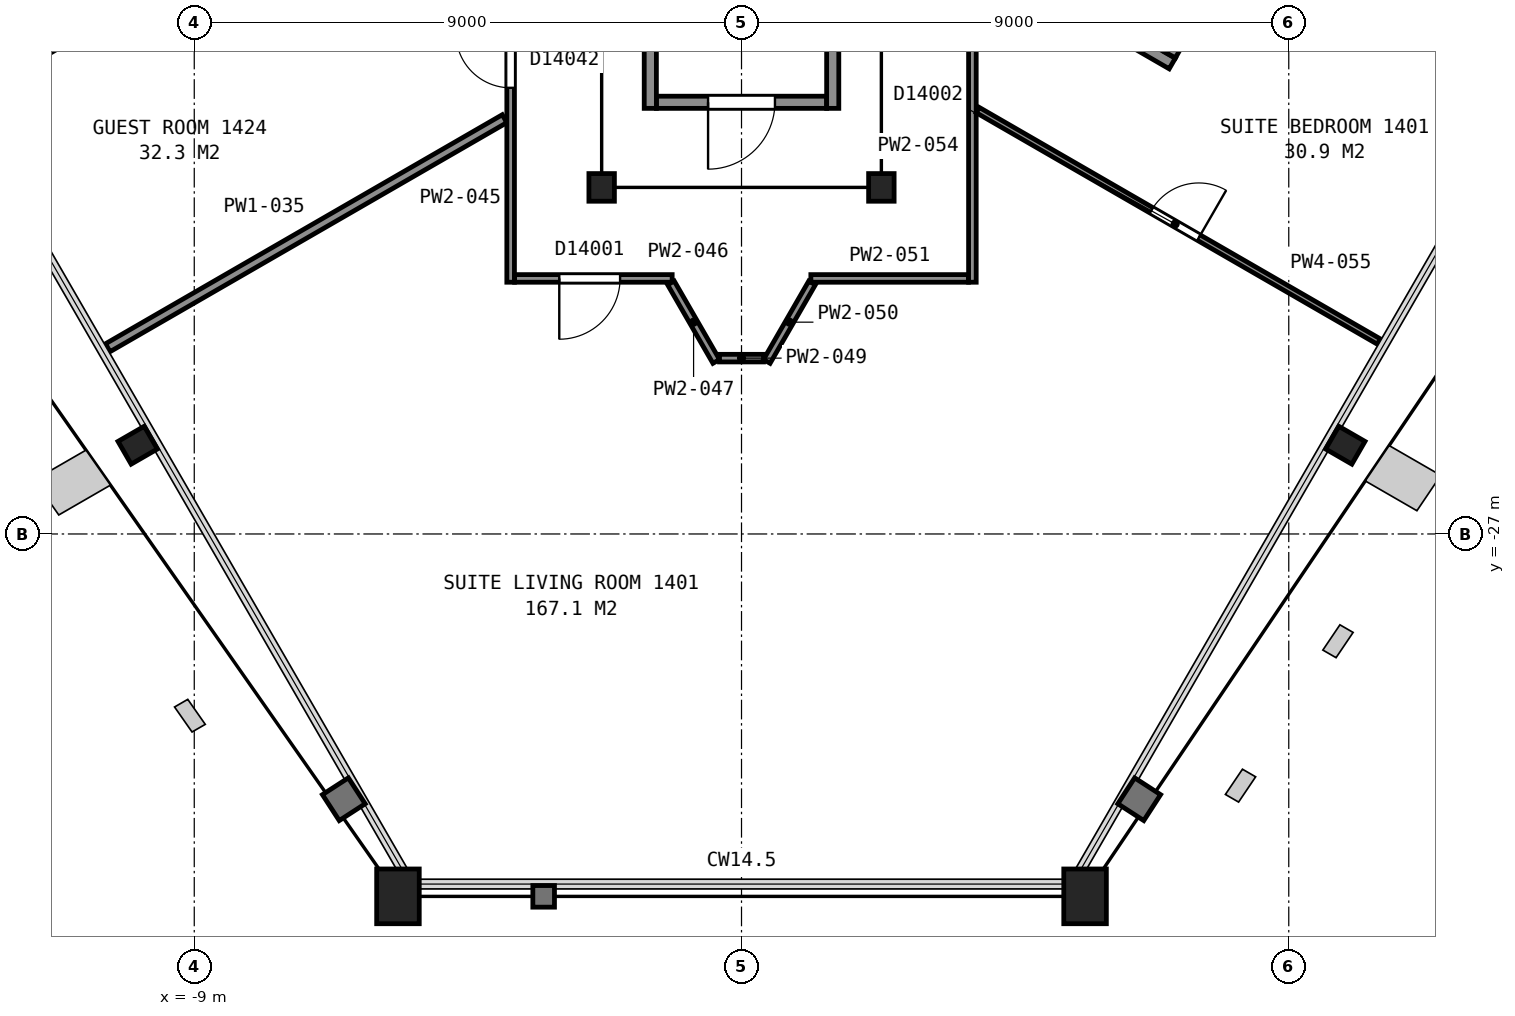
"""IFC4 building model, lengths in metres.
Left out: names, types, materials, properties, quantities, classifications, styles, units other than length and angle.
Written with IfcOpenShell. Run it as: python <this file> out.ifc"""

import sys

from ifc_helpers import new_model, si_unit, direction, frame, frame_2d, origin, origin_2d, place, context, subcontext, project, spatial, rectangle, hollow_rectangle, i_section, extrude, element, fill, save


model = new_model("IFC4")
c1 = context("Model", 3, precision=1e-05, world=origin(), true_north=direction((0.0, 1.0)))
c2 = subcontext(c1, "Body", "Model", "MODEL_VIEW")
j1 = project(units=[si_unit("LENGTHUNIT", "METRE"), si_unit("PLANEANGLEUNIT", "RADIAN")], contexts=[c1])
p1 = place(None, origin())
s1 = spatial("IfcSite", under=j1, at=p1, CompositionType="ELEMENT")
p2 = place(p1, origin())
s2 = spatial("IfcBuilding", under=s1, at=p2, CompositionType="ELEMENT")
p3 = place(p2, frame((0.0, 0.0, 65.6)))
s3 = spatial("IfcBuildingStorey", under=s2, at=p3, CompositionType="ELEMENT", Elevation=65.6)
p4 = place(p3, frame((-9.93, -25.54, 0.025), z_axis=(0.0, 0.0, 1.0), x_axis=(-0.5, 0.866025403784, 0.0)))
e1 = element("IfcColumn", 1, at=p4, inside=s3, PredefinedType="COLUMN", context=c2, shape_type="SweptSolid", body=[
    extrude(i_section(OverallWidth=0.432, OverallDepth=0.498, WebThickness=0.056, FlangeThickness=0.089, FilletRadius=0.015, at=origin_2d()), origin(), (0.0, 0.0, 1.0), 3.575),
])
for number, where, z_axis, x_axis in (
    (2, (-5.65, -32.96, 0.04), (0.0, 0.0, 1.0), (-1.0, 0.0, 0.0)),
    (3, (5.65, -32.96, 0.04), (0.0, 0.0, 1.0), (-1.0, 0.0, 0.0)),
):
    element("IfcColumn", number, at=place(p3, frame(where, z_axis=z_axis, x_axis=x_axis)), inside=s3, PredefinedType="COLUMN", context=c2, shape_type="SweptSolid", body=[
        extrude(hollow_rectangle(XDim=0.7, YDim=0.9, WallThickness=0.065, at=origin_2d()), origin(), (0.0, 0.0, 1.0), 3.56),
    ])
p5 = place(p3, frame((9.93, -25.54, 0.025), z_axis=(0.0, 0.0, 1.0), x_axis=(-0.5, -0.866025403784, 0.0)))
e4 = element("IfcColumn", 4, at=p5, inside=s3, PredefinedType="COLUMN", context=c2, shape_type="SweptSolid", body=[
    extrude(i_section(OverallWidth=0.432, OverallDepth=0.498, WebThickness=0.056, FlangeThickness=0.089, FilletRadius=0.015, at=origin_2d()), origin(), (0.0, 0.0, 1.0), 3.575),
])
for number, where, z_axis, x_axis in (
    (5, (-2.3, -21.3, 0.0), (0.0, 0.0, 1.0), (-1.0, 0.0, 0.0)),
    (6, (2.3, -21.3, 0.0), (0.0, 0.0, 1.0), (-1.0, 0.0, 0.0)),
):
    element("IfcColumn", number, at=place(p3, frame(where, z_axis=z_axis, x_axis=x_axis)), inside=s3, PredefinedType="COLUMN", context=c2, shape_type="SweptSolid", body=[
        extrude(i_section(OverallWidth=0.419, OverallDepth=0.455, WebThickness=0.042, FlangeThickness=0.068, FilletRadius=0.015, at=origin_2d()), origin(), (0.0, 0.0, 1.0), 3.6),
    ])
p6 = place(p3, frame((-1.4, -19.9, 0.0), z_axis=(0.0, 0.0, 1.0), x_axis=(1.0, 0.0, 0.0)))
e7 = element("IfcWall", 7, at=p6, inside=s3, PredefinedType="PARTITIONING", context=c2, shape_type="SweptSolid", body=[
    extrude(rectangle(XDim=2.8, YDim=0.2, at=frame_2d((1.4, 0.0))), origin(), (0.0, 0.0, 1.0), 3.35),
])
p7 = place(p6, frame((0.85, 0.0, 0.0)))
e8 = element("IfcOpeningElement", 8, at=p7, cuts=e7, PredefinedType="OPENING", context=c2, shape_type="SweptSolid", body=[
    extrude(rectangle(XDim=1.1, YDim=2.1, at=frame_2d((0.55, 1.05))), frame((0.0, 0.11, 0.0), z_axis=(0.0, -1.0, 0.0), x_axis=(1.0, 0.0, 0.0)), (0.0, 0.0, 1.0), 0.22),
])
for number, where, z_axis, x_axis in (
    (9, (1.5, -8.0, 0.0), (0.0, 0.0, 1.0), (0.0, -1.0, 0.0)),
    (10, (-1.5, -8.0, 0.0), (0.0, 0.0, 1.0), (0.0, -1.0, 0.0)),
):
    element("IfcWall", number, at=place(p3, frame(where, z_axis=z_axis, x_axis=x_axis)), inside=s3, PredefinedType="PARTITIONING", context=c2, shape_type="SweptSolid", body=[
        extrude(rectangle(XDim=12.0, YDim=0.2, at=frame_2d((6.0, 0.0))), origin(), (0.0, 0.0, 1.0), 3.35),
    ])
p8 = place(p3, frame((-12.794, -19.829, 0.0), z_axis=(0.0, 0.0, 1.0), x_axis=(0.866024716685, 0.500001190089, 0.0)))
e11 = element("IfcWall", 11, at=p8, inside=s3, PredefinedType="PARTITIONING", context=c2, shape_type="SweptSolid", body=[
    extrude(rectangle(XDim=8.492, YDim=0.15, at=frame_2d((4.246, 0.0))), origin(), (0.0, 0.0, 1.0), 2.613),
])
p9 = place(p3, frame((-10.423, -23.937, 0.0), z_axis=(0.0, 0.0, 1.0), x_axis=(0.866039368072, 0.499975812365, 0.0)))
e12 = element("IfcWall", 12, at=p9, inside=s3, PredefinedType="PARTITIONING", context=c2, shape_type="SweptSolid", body=[
    extrude(rectangle(XDim=7.535, YDim=0.15, at=frame_2d((3.768, 0.0))), origin(), (0.0, 0.0, 1.0), 2.613),
])
p10 = place(p3, frame((-3.797, -22.86, 0.0), z_axis=(0.0, 0.0, 1.0), x_axis=(0.0, 1.0, 0.0)))
e13 = element("IfcWall", 13, at=p10, inside=s3, PredefinedType="PARTITIONING", context=c2, shape_type="SweptSolid", body=[
    extrude(rectangle(XDim=4.471, YDim=0.125, at=frame_2d((2.235, 0.0))), origin(), (0.0, 0.0, 1.0), 2.613),
])
p11 = place(p10, frame((3.198, 0.0, 0.0)))
e14 = element("IfcOpeningElement", 14, at=p11, cuts=e13, PredefinedType="OPENING", context=c2, shape_type="SweptSolid", body=[
    extrude(rectangle(XDim=0.9, YDim=2.1, at=frame_2d((0.45, 1.05))), frame((0.0, 0.073, 0.0), z_axis=(0.0, -1.0, 0.0), x_axis=(1.0, 0.0, 0.0)), (0.0, 0.0, 1.0), 0.145),
])
p12 = place(p3, frame((-1.14, -22.797, 0.0), z_axis=(0.0, 0.0, 1.0), x_axis=(-1.0, 0.0, 0.0)))
e15 = element("IfcWall", 15, at=p12, inside=s3, PredefinedType="PARTITIONING", context=c2, shape_type="SweptSolid", body=[
    extrude(rectangle(XDim=2.592, YDim=0.125, at=frame_2d((1.296, 0.0))), origin(), (0.0, 0.0, 1.0), 2.613),
])
p13 = place(p12, frame((0.856, 0.0, 0.0)))
e16 = element("IfcOpeningElement", 16, at=p13, cuts=e15, PredefinedType="OPENING", context=c2, shape_type="SweptSolid", body=[
    extrude(rectangle(XDim=1.0, YDim=2.1, at=frame_2d((0.5, 1.05))), frame((0.0, 0.073, 0.0), z_axis=(0.0, -1.0, 0.0), x_axis=(1.0, 0.0, 0.0)), (0.0, 0.0, 1.0), 0.145),
])
p14 = place(p3, frame((-1.161, -22.871, 0.0), z_axis=(0.0, 0.0, 1.0), x_axis=(0.499609040113, -0.866251006947, 0.0)))
e17 = element("IfcWall", 17, at=p14, inside=s3, PredefinedType="PARTITIONING", context=c2, shape_type="SweptSolid", body=[
    extrude(rectangle(XDim=1.491, YDim=0.125, at=frame_2d((0.746, 0.0))), origin(), (0.0, 0.0, 1.0), 2.613),
])
p15 = place(p3, frame((-0.362, -24.108, 0.0), z_axis=(0.0, 0.0, 1.0), x_axis=(1.0, 0.0, 0.0)))
e18 = element("IfcWall", 18, at=p15, inside=s3, PredefinedType="PARTITIONING", context=c2, shape_type="SweptSolid", body=[
    extrude(rectangle(XDim=0.724, YDim=0.125, at=frame_2d((0.362, 0.0))), origin(), (0.0, 0.0, 1.0), 2.613),
])
p16 = place(p3, frame((0.416, -24.162, 0.0), z_axis=(0.0, 0.0, 1.0), x_axis=(0.499609040113, 0.866251006947, 0.0)))
e19 = element("IfcWall", 19, at=p16, inside=s3, PredefinedType="PARTITIONING", context=c2, shape_type="SweptSolid", body=[
    extrude(rectangle(XDim=1.491, YDim=0.125, at=frame_2d((0.746, 0.0))), origin(), (0.0, 0.0, 1.0), 2.613),
])
p17 = place(p3, frame((1.14, -22.797, 0.0), z_axis=(0.0, 0.0, 1.0), x_axis=(1.0, 0.0, 0.0)))
e20 = element("IfcWall", 20, at=p17, inside=s3, PredefinedType="PARTITIONING", context=c2, shape_type="SweptSolid", body=[
    extrude(rectangle(XDim=2.592, YDim=0.125, at=frame_2d((1.296, 0.0))), origin(), (0.0, 0.0, 1.0), 2.613),
])
p18 = place(p3, frame((3.797, -22.86, 0.0), z_axis=(0.0, 0.0, 1.0), x_axis=(0.0, 1.0, 0.0)))
e21 = element("IfcWall", 21, at=p18, inside=s3, PredefinedType="PARTITIONING", context=c2, shape_type="SweptSolid", body=[
    extrude(rectangle(XDim=4.471, YDim=0.125, at=frame_2d((2.235, 0.0))), origin(), (0.0, 0.0, 1.0), 2.613),
])
p19 = place(p3, frame((3.885, -20.028, 0.0), z_axis=(0.0, 0.0, 1.0), x_axis=(0.866080975745, -0.499903734186, 0.0)))
e22 = element("IfcWall", 22, at=p19, inside=s3, PredefinedType="PARTITIONING", context=c2, shape_type="SweptSolid", body=[
    extrude(rectangle(XDim=7.617, YDim=0.1, at=frame_2d((3.808, 0.0))), origin(), (0.0, 0.0, 1.0), 2.613),
])
p20 = place(p19, frame((3.299, 0.0, 0.0)))
e23 = element("IfcOpeningElement", 23, at=p20, cuts=e22, PredefinedType="OPENING", context=c2, shape_type="SweptSolid", body=[
    extrude(rectangle(XDim=0.9, YDim=2.1, at=frame_2d((0.45, 1.05))), frame((0.0, 0.06, 0.0), z_axis=(0.0, -1.0, 0.0), x_axis=(1.0, 0.0, 0.0)), (0.0, 0.0, 1.0), 0.12),
])
p21 = place(p3, frame((4.258, -17.631, 0.0), z_axis=(0.0, 0.0, 1.0), x_axis=(0.865982457891, -0.500074377092, 0.0)))
e24 = element("IfcWall", 24, at=p21, inside=s3, PredefinedType="PARTITIONING", context=c2, shape_type="SweptSolid", body=[
    extrude(rectangle(XDim=3.263, YDim=0.2, at=frame_2d((1.631, 0.0))), origin(), (0.0, 0.0, 1.0), 2.613),
])
p22 = place(p3, frame((5.558, -15.38, 0.0), z_axis=(0.0, 0.0, 1.0), x_axis=(0.866022790583, -0.50000452617, 0.0)))
e25 = element("IfcWall", 25, at=p22, inside=s3, PredefinedType="PARTITIONING", context=c2, shape_type="SweptSolid", body=[
    extrude(rectangle(XDim=8.491, YDim=0.15, at=frame_2d((4.246, 0.0))), origin(), (0.0, 0.0, 1.0), 2.613),
])
p23 = place(p3, frame((7.049, -19.122, 0.0), z_axis=(0.0, 0.0, 1.0), x_axis=(0.491544985814, 0.870852184312, 0.0)))
e26 = element("IfcWall", 26, at=p23, inside=s3, PredefinedType="PARTITIONING", context=c2, shape_type="SweptSolid", body=[
    extrude(rectangle(XDim=2.419, YDim=0.2, at=frame_2d((1.209, 0.0))), origin(), (0.0, 0.0, 1.0), 2.613),
])
p24 = place(p23, frame((0.795, 0.0, 0.0)))
e27 = element("IfcOpeningElement", 27, at=p24, cuts=e26, PredefinedType="OPENING", context=c2, shape_type="SweptSolid", body=[
    extrude(rectangle(XDim=0.8, YDim=2.1, at=frame_2d((0.4, 1.05))), frame((0.0, 0.11, 0.0), z_axis=(0.0, -1.0, 0.0), x_axis=(1.0, 0.0, 0.0)), (0.0, 0.0, 1.0), 0.22),
])
p25 = place(p7, origin())
e28 = element("IfcDoor", 28, at=p25, inside=s3, OperationType="SINGLE_SWING_LEFT", PredefinedType="DOOR", context=c2, shape_type="SweptSolid", body=[
    extrude(rectangle(XDim=1.1, YDim=2.1, at=frame_2d((0.55, 1.05))), frame((0.0, 0.025, 0.0), z_axis=(0.0, -1.0, 0.0), x_axis=(1.0, 0.0, 0.0)), (0.0, 0.0, 1.0), 0.05),
])
fill(e8, e28)
p26 = place(p11, origin())
e29 = element("IfcDoor", 29, at=p26, inside=s3, OperationType="SINGLE_SWING_RIGHT", PredefinedType="DOOR", context=c2, shape_type="SweptSolid", body=[
    extrude(rectangle(XDim=0.9, YDim=2.1, at=frame_2d((0.45, 1.05))), frame((0.0, 0.025, 0.0), z_axis=(0.0, -1.0, 0.0), x_axis=(1.0, 0.0, 0.0)), (0.0, 0.0, 1.0), 0.05),
])
fill(e14, e29)
p27 = place(p13, origin())
e30 = element("IfcDoor", 30, at=p27, inside=s3, OperationType="SINGLE_SWING_RIGHT", PredefinedType="DOOR", context=c2, shape_type="SweptSolid", body=[
    extrude(rectangle(XDim=1.0, YDim=2.1, at=frame_2d((0.5, 1.05))), frame((0.0, 0.025, 0.0), z_axis=(0.0, -1.0, 0.0), x_axis=(1.0, 0.0, 0.0)), (0.0, 0.0, 1.0), 0.05),
])
fill(e16, e30)
p28 = place(p20, origin())
e31 = element("IfcDoor", 31, at=p28, inside=s3, OperationType="SINGLE_SWING_RIGHT", PredefinedType="DOOR", context=c2, shape_type="SweptSolid", body=[
    extrude(rectangle(XDim=0.9, YDim=2.1, at=frame_2d((0.45, 1.05))), frame((0.0, 0.025, 0.0), z_axis=(0.0, -1.0, 0.0), x_axis=(1.0, 0.0, 0.0)), (0.0, 0.0, 1.0), 0.05),
])
fill(e23, e31)
save(model, sys.argv[1])
